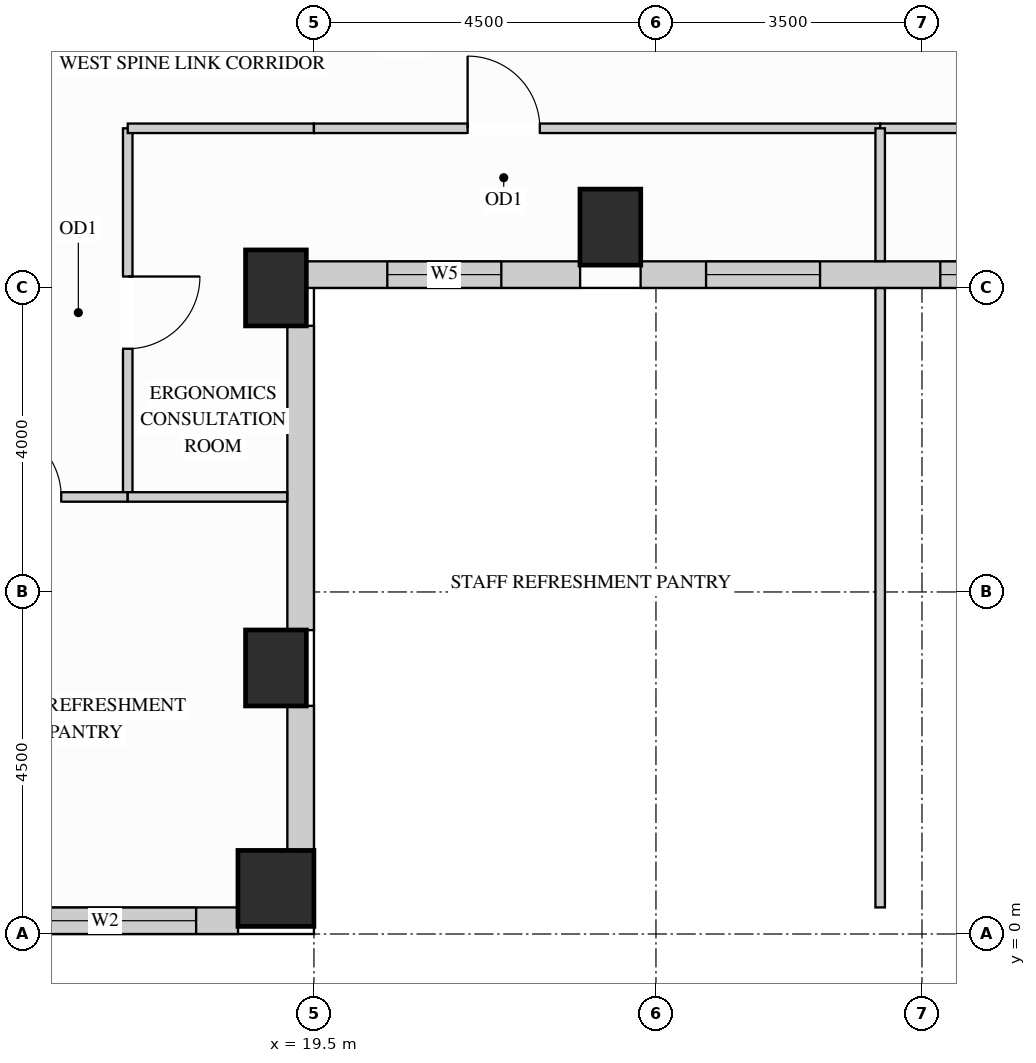
"""IFC4 building model, lengths in metres.
Left out: names, types, materials, properties, quantities, classifications, styles, units other than length and angle.
Written with IfcOpenShell. Run it as: python <this file> out.ifc"""

import sys

from ifc_helpers import new_model, si_unit, direction, frame, frame_2d, origin, origin_2d, place, context, subcontext, project, spatial, rectangle, extrude, source, transform, mapped, element, fill, save


model = new_model("IFC4")
c1 = context("Model", 3, precision=1e-05, world=origin(), true_north=direction((0.0, 1.0)))
c2 = subcontext(c1, "Body", "Model", "MODEL_VIEW")
j1 = project(units=[si_unit("LENGTHUNIT", "METRE"), si_unit("PLANEANGLEUNIT", "RADIAN")], contexts=[c1])
p1 = place(None, origin())
s1 = spatial("IfcSite", under=j1, at=p1, CompositionType="ELEMENT")
p2 = place(p1, origin())
s2 = spatial("IfcBuilding", under=s1, at=p2, CompositionType="ELEMENT")
p3 = place(p2, frame((0.0, 0.0, 157.5)))
s3 = spatial("IfcBuildingStorey", under=s2, at=p3, CompositionType="ELEMENT", Elevation=157.5)
m1 = source(origin(), c2, "Body", "SweptSolid", [
    extrude(rectangle(XDim=0.8, YDim=1.0, at=origin_2d()), origin(), (0.0, 0.0, 1.0), 3.4),
])
for number, where, z_axis, x_axis in (
    (1, (19.0, 3.5, 0.0), (0.0, 0.0, 1.0), (1.0, 0.0, 0.0)),
    (2, (19.0, 8.5, 0.0), (0.0, 0.0, 1.0), (1.0, 0.0, 0.0)),
    (3, (23.4, 9.3, 0.0), (0.0, 0.0, 1.0), (1.0, 0.0, 0.0)),
):
    element("IfcColumn", number, at=place(p3, frame(where, z_axis=z_axis, x_axis=x_axis)), inside=s3, PredefinedType="COLUMN", context=c2, shape_type="MappedRepresentation", body=[
        mapped(m1, transform((0.0, 0.0, 0.0), x_axis=(1.0, 0.0, 0.0), y_axis=(0.0, 1.0, 0.0), z_axis=(0.0, 0.0, 1.0))),
    ])
m2 = source(origin(), c2, "Body", "SweptSolid", [
    extrude(rectangle(XDim=1.0, YDim=1.0, at=origin_2d()), origin(), (0.0, 0.0, 1.0), 3.4),
])
p4 = place(p3, frame((19.0, 0.6, 0.0), z_axis=(0.0, 0.0, 1.0), x_axis=(1.0, 0.0, 0.0)))
e4 = element("IfcColumn", 4, at=p4, inside=s3, PredefinedType="COLUMN", context=c2, shape_type="MappedRepresentation", body=[
    mapped(m2, transform((0.0, 0.0, 0.0), x_axis=(1.0, 0.0, 0.0), y_axis=(0.0, 1.0, 0.0), z_axis=(0.0, 0.0, 1.0))),
])
p5 = place(p3, frame((14.998, 0.175, 0.0), z_axis=(0.0, 0.0, 1.0), x_axis=(1.0, 0.0, 0.0)))
e5 = element("IfcWall", 5, at=p5, inside=s3, PredefinedType="SOLIDWALL", context=c2, shape_type="SweptSolid", body=[
    extrude(rectangle(XDim=3.504, YDim=0.35, at=frame_2d((1.752, 0.0))), origin(), (0.0, 0.0, 1.0), 2.612),
])
p6 = place(p5, frame((0.552, 0.0, 0.78)))
e6 = element("IfcOpeningElement", 6, at=p6, cuts=e5, PredefinedType="OPENING", context=c2, shape_type="SweptSolid", body=[
    extrude(rectangle(XDim=2.4, YDim=1.652, at=frame_2d((1.2, 0.826))), frame((0.0, 0.185, 0.0), z_axis=(0.0, -1.0, 0.0), x_axis=(1.0, 0.0, 0.0)), (0.0, 0.0, 1.0), 0.37),
])
m3 = source(origin(), c2, "Body", "SweptSolid", [
    extrude(rectangle(XDim=1.904, YDim=0.35, at=frame_2d((0.952, 0.0))), origin(), (0.0, 0.0, 1.0), 2.612),
])
p7 = place(p3, frame((19.325, 1.098, 0.0), z_axis=(0.0, 0.0, 1.0), x_axis=(0.0, 1.0, 0.0)))
e7 = element("IfcWall", 7, at=p7, inside=s3, PredefinedType="SOLIDWALL", context=c2, shape_type="MappedRepresentation", body=[
    mapped(m3, transform((0.0, 0.0, 0.0), x_axis=(1.0, 0.0, 0.0), y_axis=(0.0, 1.0, 0.0), z_axis=(0.0, 0.0, 1.0))),
])
m4 = source(origin(), c2, "Body", "SweptSolid", [
    extrude(rectangle(XDim=4.004, YDim=0.35, at=frame_2d((2.002, 0.0))), origin(), (0.0, 0.0, 1.0), 2.612),
])
p8 = place(p3, frame((19.325, 3.998, 0.0), z_axis=(0.0, 0.0, 1.0), x_axis=(0.0, 1.0, 0.0)))
e8 = element("IfcWall", 8, at=p8, inside=s3, PredefinedType="SOLIDWALL", context=c2, shape_type="MappedRepresentation", body=[
    mapped(m4, transform((0.0, 0.0, 0.0), x_axis=(1.0, 0.0, 0.0), y_axis=(0.0, 1.0, 0.0), z_axis=(0.0, 0.0, 1.0))),
])
p9 = place(p3, frame((19.398, 8.675, 0.0), z_axis=(0.0, 0.0, 1.0), x_axis=(1.0, 0.0, 0.0)))
e9 = element("IfcWall", 9, at=p9, inside=s3, PredefinedType="SOLIDWALL", context=c2, shape_type="SweptSolid", body=[
    extrude(rectangle(XDim=3.604, YDim=0.35, at=frame_2d((1.802, 0.0))), origin(), (0.0, 0.0, 1.0), 3.385),
])
p10 = place(p9, frame((1.067, 0.0, 0.78)))
e10 = element("IfcOpeningElement", 10, at=p10, cuts=e9, PredefinedType="OPENING", context=c2, shape_type="SweptSolid", body=[
    extrude(rectangle(XDim=1.5, YDim=2.0, at=frame_2d((0.75, 1.0))), frame((0.0, 0.185, 0.0), z_axis=(0.0, -1.0, 0.0), x_axis=(1.0, 0.0, 0.0)), (0.0, 0.0, 1.0), 0.37),
])
p11 = place(p3, frame((23.798, 8.675, 0.0), z_axis=(0.0, 0.0, 1.0), x_axis=(1.0, 0.0, 0.0)))
e11 = element("IfcWall", 11, at=p11, inside=s3, PredefinedType="SOLIDWALL", context=c2, shape_type="SweptSolid", body=[
    extrude(rectangle(XDim=6.304, YDim=0.35, at=frame_2d((3.152, 0.0))), origin(), (0.0, 0.0, 1.0), 3.385),
])
p12 = place(p11, frame((0.861, 0.0, 0.78)))
e12 = element("IfcOpeningElement", 12, at=p12, cuts=e11, PredefinedType="OPENING", context=c2, shape_type="SweptSolid", body=[
    extrude(rectangle(XDim=1.5, YDim=2.0, at=frame_2d((0.75, 1.0))), frame((0.0, 0.185, 0.0), z_axis=(0.0, -1.0, 0.0), x_axis=(1.0, 0.0, 0.0)), (0.0, 0.0, 1.0), 0.37),
])
p13 = place(p11, frame((3.943, 0.0, 0.78)))
e13 = element("IfcOpeningElement", 13, at=p13, cuts=e11, PredefinedType="OPENING", context=c2, shape_type="SweptSolid", body=[
    extrude(rectangle(XDim=1.5, YDim=2.0, at=frame_2d((0.75, 1.0))), frame((0.0, 0.185, 0.0), z_axis=(0.0, -1.0, 0.0), x_axis=(1.0, 0.0, 0.0)), (0.0, 0.0, 1.0), 0.37),
])
p14 = place(p3, frame((17.05, 5.75, 0.0), z_axis=(0.0, 0.0, 1.0), x_axis=(0.0, 1.0, 0.0)))
e14 = element("IfcWall", 14, at=p14, inside=s3, PredefinedType="PARTITIONING", context=c2, shape_type="SweptSolid", body=[
    extrude(rectangle(XDim=4.85, YDim=0.125, at=frame_2d((2.425, 0.0))), origin(), (0.0, 0.0, 1.0), 3.385),
])
p15 = place(p14, frame((1.95, 0.0, 0.0)))
e15 = element("IfcOpeningElement", 15, at=p15, cuts=e14, PredefinedType="OPENING", context=c2, shape_type="SweptSolid", body=[
    extrude(rectangle(XDim=0.95, YDim=2.15, at=frame_2d((0.475, 1.075))), frame((0.0, 0.073, 0.0), z_axis=(0.0, -1.0, 0.0), x_axis=(1.0, 0.0, 0.0)), (0.0, 0.0, 1.0), 0.145),
])
m5 = source(origin(), c2, "Body", "SweptSolid", [
    extrude(rectangle(XDim=2.45, YDim=0.125, at=frame_2d((1.225, 0.0))), origin(), (0.0, 0.0, 1.0), 3.385),
])
p16 = place(p3, frame((17.05, 10.6, 0.0), z_axis=(0.0, 0.0, 1.0), x_axis=(1.0, 0.0, 0.0)))
e16 = element("IfcWall", 16, at=p16, inside=s3, PredefinedType="PARTITIONING", context=c2, shape_type="MappedRepresentation", body=[
    mapped(m5, transform((0.0, 0.0, 0.0), x_axis=(1.0, 0.0, 0.0), y_axis=(0.0, 1.0, 0.0), z_axis=(0.0, 0.0, 1.0))),
])
p17 = place(p3, frame((19.5, 10.6, 0.0), z_axis=(0.0, 0.0, 1.0), x_axis=(1.0, 0.0, 0.0)))
e17 = element("IfcWall", 17, at=p17, inside=s3, PredefinedType="PARTITIONING", context=c2, shape_type="SweptSolid", body=[
    extrude(rectangle(XDim=7.45, YDim=0.125, at=frame_2d((3.725, 0.0))), origin(), (0.0, 0.0, 1.0), 3.385),
])
p18 = place(p17, frame((2.022, 0.0, 0.0)))
e18 = element("IfcOpeningElement", 18, at=p18, cuts=e17, PredefinedType="OPENING", context=c2, shape_type="SweptSolid", body=[
    extrude(rectangle(XDim=0.95, YDim=2.15, at=frame_2d((0.475, 1.075))), frame((0.0, 0.073, 0.0), z_axis=(0.0, -1.0, 0.0), x_axis=(1.0, 0.0, 0.0)), (0.0, 0.0, 1.0), 0.145),
])
p19 = place(p3, frame((26.95, 10.6, 0.0), z_axis=(0.0, 0.0, 1.0), x_axis=(1.0, 0.0, 0.0)))
e19 = element("IfcWall", 19, at=p19, inside=s3, PredefinedType="PARTITIONING", context=c2, shape_type="SweptSolid", body=[
    extrude(rectangle(XDim=7.45, YDim=0.125, at=frame_2d((3.725, 0.0))), origin(), (0.0, 0.0, 1.0), 3.385),
])
p20 = place(p19, frame((4.478, 0.0, 0.0)))
e20 = element("IfcOpeningElement", 20, at=p20, cuts=e19, PredefinedType="OPENING", context=c2, shape_type="SweptSolid", body=[
    extrude(rectangle(XDim=0.95, YDim=2.15, at=frame_2d((0.475, 1.075))), frame((0.0, 0.073, 0.0), z_axis=(0.0, -1.0, 0.0), x_axis=(1.0, 0.0, 0.0)), (0.0, 0.0, 1.0), 0.145),
])
m6 = source(origin(), c2, "Body", "SweptSolid", [
    extrude(rectangle(XDim=8.148, YDim=0.125, at=frame_2d((4.074, 0.0))), origin(), (0.0, 0.0, 1.0), 3.385),
])
p21 = place(p3, frame((26.95, 0.35, 0.0), z_axis=(0.0, 0.0, 1.0), x_axis=(0.0, 1.0, 0.0)))
e21 = element("IfcWall", 21, at=p21, inside=s3, PredefinedType="PARTITIONING", context=c2, shape_type="MappedRepresentation", body=[
    mapped(m6, transform((0.0, 0.0, 0.0), x_axis=(1.0, 0.0, 0.0), y_axis=(0.0, 1.0, 0.0), z_axis=(0.0, 0.0, 1.0))),
])
m7 = source(origin(), c2, "Body", "SweptSolid", [
    extrude(rectangle(XDim=1.748, YDim=0.125, at=frame_2d((0.874, 0.0))), origin(), (0.0, 0.0, 1.0), 3.385),
])
p22 = place(p3, frame((26.95, 8.852, 0.0), z_axis=(0.0, 0.0, 1.0), x_axis=(0.0, 1.0, 0.0)))
e22 = element("IfcWall", 22, at=p22, inside=s3, PredefinedType="PARTITIONING", context=c2, shape_type="MappedRepresentation", body=[
    mapped(m7, transform((0.0, 0.0, 0.0), x_axis=(1.0, 0.0, 0.0), y_axis=(0.0, 1.0, 0.0), z_axis=(0.0, 0.0, 1.0))),
])
p23 = place(p3, frame((14.35, 5.75, 0.0), z_axis=(0.0, 0.0, 1.0), x_axis=(1.0, 0.0, 0.0)))
e23 = element("IfcWall", 23, at=p23, inside=s3, PredefinedType="PARTITIONING", context=c2, shape_type="SweptSolid", body=[
    extrude(rectangle(XDim=2.7, YDim=0.125, at=frame_2d((1.35, 0.0))), origin(), (0.0, 0.0, 1.0), 3.385),
])
p24 = place(p23, frame((0.875, 0.0, 0.0)))
e24 = element("IfcOpeningElement", 24, at=p24, cuts=e23, PredefinedType="OPENING", context=c2, shape_type="SweptSolid", body=[
    extrude(rectangle(XDim=0.95, YDim=2.15, at=frame_2d((0.475, 1.075))), frame((0.0, 0.073, 0.0), z_axis=(0.0, -1.0, 0.0), x_axis=(1.0, 0.0, 0.0)), (0.0, 0.0, 1.0), 0.145),
])
m8 = source(origin(), c2, "Body", "SweptSolid", [
    extrude(rectangle(XDim=2.098, YDim=0.125, at=frame_2d((1.049, 0.0))), origin(), (0.0, 0.0, 1.0), 3.385),
])
p25 = place(p3, frame((17.05, 5.75, 0.0), z_axis=(0.0, 0.0, 1.0), x_axis=(1.0, 0.0, 0.0)))
e25 = element("IfcWall", 25, at=p25, inside=s3, PredefinedType="PARTITIONING", context=c2, shape_type="MappedRepresentation", body=[
    mapped(m8, transform((0.0, 0.0, 0.0), x_axis=(1.0, 0.0, 0.0), y_axis=(0.0, 1.0, 0.0), z_axis=(0.0, 0.0, 1.0))),
])
m9 = source(origin(), c2, "Body", "SweptSolid", [
    extrude(rectangle(XDim=0.95, YDim=2.15, at=frame_2d((0.475, 1.075))), frame((0.0, 0.025, 0.0), z_axis=(0.0, -1.0, 0.0), x_axis=(1.0, 0.0, 0.0)), (0.0, 0.0, 1.0), 0.05),
])
p26 = place(p15, origin())
e26 = element("IfcDoor", 26, at=p26, inside=s3, OperationType="SINGLE_SWING_RIGHT", PredefinedType="DOOR", context=c2, shape_type="MappedRepresentation", body=[
    mapped(m9, transform((0.0, 0.0, 0.0), x_axis=(1.0, 0.0, 0.0), y_axis=(0.0, 1.0, 0.0), z_axis=(0.0, 0.0, 1.0))),
])
fill(e15, e26)
p27 = place(p24, origin())
e27 = element("IfcDoor", 27, at=p27, inside=s3, OperationType="SINGLE_SWING_LEFT", PredefinedType="DOOR", context=c2, shape_type="MappedRepresentation", body=[
    mapped(m9, transform((0.0, 0.0, 0.0), x_axis=(1.0, 0.0, 0.0), y_axis=(0.0, 1.0, 0.0), z_axis=(0.0, 0.0, 1.0))),
])
fill(e24, e27)
p28 = place(p18, origin())
e28 = element("IfcDoor", 28, at=p28, inside=s3, OperationType="SINGLE_SWING_LEFT", PredefinedType="DOOR", context=c2, shape_type="MappedRepresentation", body=[
    mapped(m9, transform((0.0, 0.0, 0.0), x_axis=(1.0, 0.0, 0.0), y_axis=(0.0, 1.0, 0.0), z_axis=(0.0, 0.0, 1.0))),
])
fill(e18, e28)
m10 = source(origin(), c2, "Body", "SweptSolid", [
    extrude(rectangle(XDim=2.4, YDim=1.652, at=frame_2d((1.2, 0.826))), frame((0.0, 0.03, 0.0), z_axis=(0.0, -1.0, 0.0), x_axis=(1.0, 0.0, 0.0)), (0.0, 0.0, 1.0), 0.06),
])
p29 = place(p6, origin())
e29 = element("IfcWindow", 29, at=p29, inside=s3, PartitioningType="SINGLE_PANEL", PredefinedType="WINDOW", context=c2, shape_type="MappedRepresentation", body=[
    mapped(m10, transform((0.0, 0.0, 0.0), x_axis=(1.0, 0.0, 0.0), y_axis=(0.0, 1.0, 0.0), z_axis=(0.0, 0.0, 1.0))),
])
fill(e6, e29)
m11 = source(origin(), c2, "Body", "SweptSolid", [
    extrude(rectangle(XDim=1.5, YDim=2.0, at=frame_2d((0.75, 1.0))), frame((0.0, 0.03, 0.0), z_axis=(0.0, -1.0, 0.0), x_axis=(1.0, 0.0, 0.0)), (0.0, 0.0, 1.0), 0.06),
])
p30 = place(p10, origin())
e30 = element("IfcWindow", 30, at=p30, inside=s3, PartitioningType="SINGLE_PANEL", PredefinedType="WINDOW", context=c2, shape_type="MappedRepresentation", body=[
    mapped(m11, transform((0.0, 0.0, 0.0), x_axis=(1.0, 0.0, 0.0), y_axis=(0.0, 1.0, 0.0), z_axis=(0.0, 0.0, 1.0))),
])
fill(e10, e30)
p31 = place(p12, origin())
e31 = element("IfcWindow", 31, at=p31, inside=s3, PartitioningType="SINGLE_PANEL", PredefinedType="WINDOW", context=c2, shape_type="MappedRepresentation", body=[
    mapped(m11, transform((0.0, 0.0, 0.0), x_axis=(1.0, 0.0, 0.0), y_axis=(0.0, 1.0, 0.0), z_axis=(0.0, 0.0, 1.0))),
])
fill(e12, e31)
p32 = place(p13, origin())
e32 = element("IfcWindow", 32, at=p32, inside=s3, PartitioningType="SINGLE_PANEL", PredefinedType="WINDOW", context=c2, shape_type="MappedRepresentation", body=[
    mapped(m11, transform((0.0, 0.0, 0.0), x_axis=(1.0, 0.0, 0.0), y_axis=(0.0, 1.0, 0.0), z_axis=(0.0, 0.0, 1.0))),
])
fill(e13, e32)
save(model, sys.argv[1])
